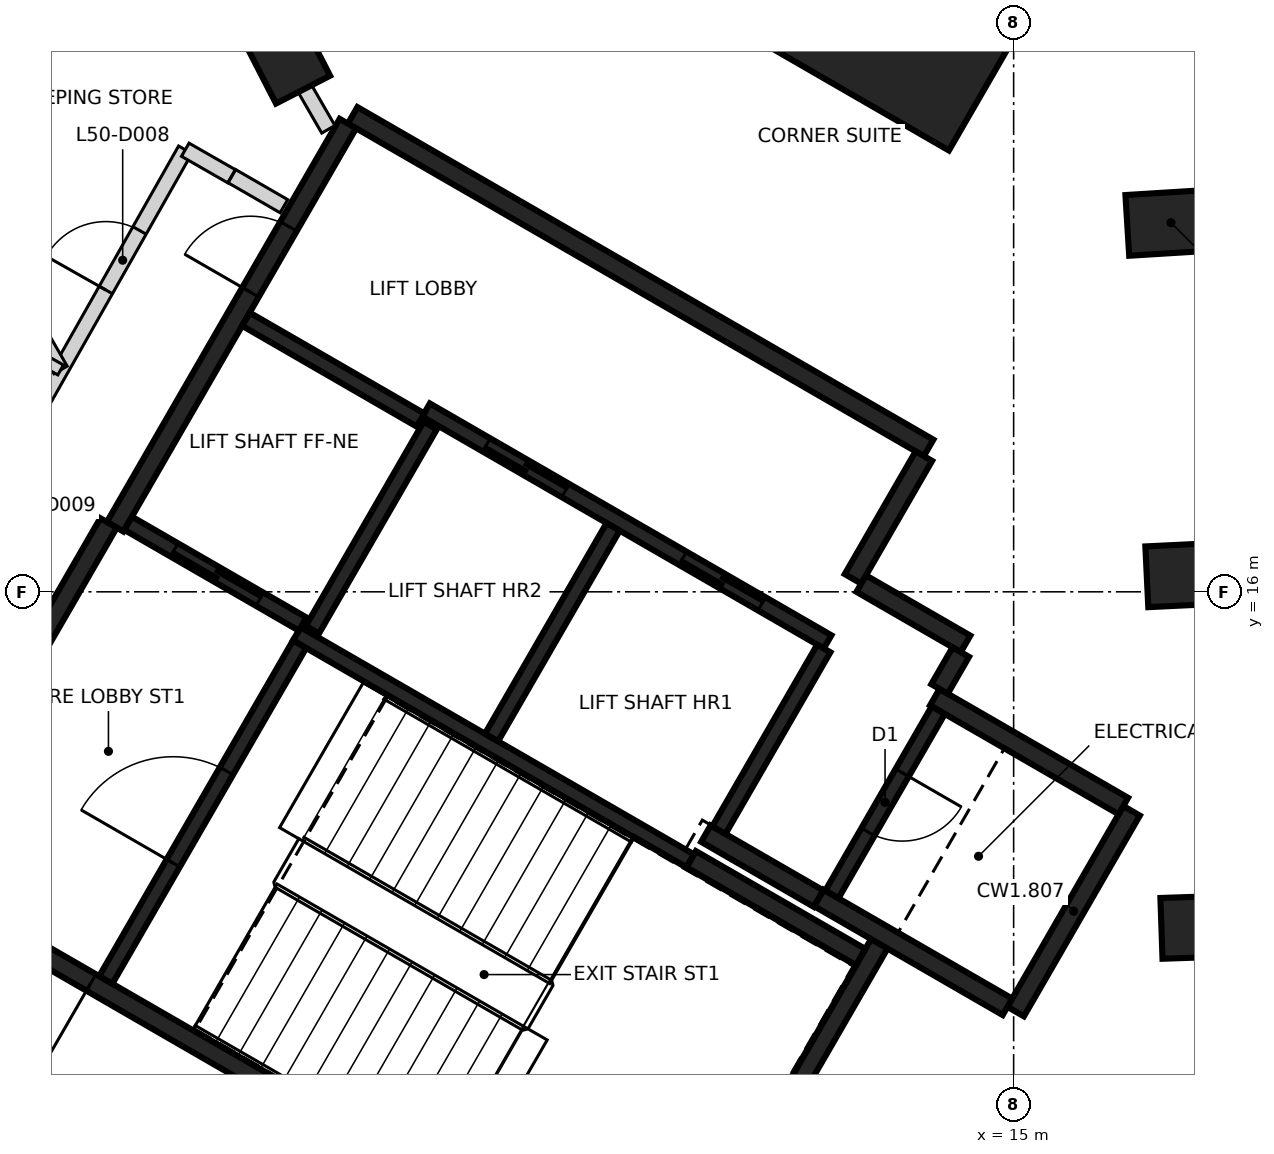
"""IFC4 building model, lengths in metres.
Left out: names, types, materials, properties, quantities, classifications, styles, units other than length and angle.
Written with IfcOpenShell. Run it as: python <this file> out.ifc"""

import sys

from ifc_helpers import new_model, si_unit, direction, frame, frame_2d, origin, origin_2d, place, context, subcontext, project, spatial, rectangle, extrude, element, fill, save


model = new_model("IFC4")
c1 = context("Model", 3, precision=1e-05, world=origin(), true_north=direction((0.0, 1.0)))
c2 = subcontext(c1, "Body", "Model", "MODEL_VIEW")
j1 = project(units=[si_unit("LENGTHUNIT", "METRE"), si_unit("PLANEANGLEUNIT", "RADIAN")], contexts=[c1])
p1 = place(None, origin())
s1 = spatial("IfcSite", under=j1, at=p1, CompositionType="ELEMENT")
p2 = place(p1, origin())
s2 = spatial("IfcBuilding", under=s1, at=p2, CompositionType="ELEMENT")
p3 = place(p2, frame((0.0, 0.0, 200.8)))
s3 = spatial("IfcBuildingStorey", under=s2, at=p3, CompositionType="ELEMENT", Elevation=200.8)
for number, where, z_axis, x_axis in (
    (1, (17.519, 11.592, -0.35), (0.0, 0.0, 1.0), (0.999, 0.034, 0.0)),
    (2, (17.326, 16.226, -0.35), (0.0, 0.0, 1.0), (0.999, 0.048, 0.0)),
    (3, (17.07, 20.856, -0.35), (0.0, 0.0, 1.0), (0.998, 0.062, 0.0)),
    (4, (5.388, 23.118, -0.35), (0.0, 0.0, 1.0), (-0.458, 0.889, 0.0)),
):
    element("IfcColumn", number, at=place(p3, frame(where, z_axis=z_axis, x_axis=x_axis)), inside=s3, PredefinedType="COLUMN", context=c2, shape_type="SweptSolid", body=[
        extrude(rectangle(XDim=1.15, YDim=0.8, at=origin_2d()), origin(), (0.0, 0.0, 1.0), 3.6),
    ])
p4 = place(p3, frame((13.78, 23.867, -0.35), z_axis=(0.0, 0.0, 1.0), x_axis=(0.5, 0.866025403784, 0.0)))
e5 = element("IfcColumn", 5, at=p4, inside=s3, PredefinedType="COLUMN", context=c2, shape_type="SweptSolid", body=[
    extrude(rectangle(XDim=3.2, YDim=2.7, at=origin_2d()), origin(), (0.0, 0.0, 1.0), 3.6),
])
p5 = place(p3, frame((10.42, 6.498, 0.0), z_axis=(0.0, 0.0, 1.0), x_axis=(-0.866021906294, 0.500006057782, 0.0)))
e6 = element("IfcWall", 6, at=p5, inside=s3, PredefinedType="SHEAR", context=c2, shape_type="SweptSolid", body=[
    extrude(rectangle(XDim=11.55, YDim=0.25, at=frame_2d((5.775, 0.0))), origin(), (0.0, 0.0, 1.0), 3.25),
])
p6 = place(p5, frame((10.025, 0.0, 0.0)))
e7 = element("IfcOpeningElement", 7, at=p6, cuts=e6, PredefinedType="OPENING", context=c2, shape_type="SweptSolid", body=[
    extrude(rectangle(XDim=1.2, YDim=2.1, at=frame_2d((0.6, 1.05))), frame((0.0, 0.135, 0.0), z_axis=(0.0, -1.0, 0.0), x_axis=(1.0, 0.0, 0.0)), (0.0, 0.0, 1.0), 0.27),
])
p7 = place(p5, frame((8.725, 0.0, 0.0)))
e8 = element("IfcOpeningElement", 8, at=p7, cuts=e6, PredefinedType="OPENING", context=c2, shape_type="SweptSolid", body=[
    extrude(rectangle(XDim=1.2, YDim=2.1, at=frame_2d((0.6, 1.05))), frame((0.0, 0.135, 0.0), z_axis=(0.0, -1.0, 0.0), x_axis=(1.0, 0.0, 0.0)), (0.0, 0.0, 1.0), 0.27),
])
p8 = place(p3, frame((6.304, 22.269, 0.0), z_axis=(0.0, 0.0, 1.0), x_axis=(0.866022959057, -0.500004234368, 0.0)))
e9 = element("IfcWall", 9, at=p8, inside=s3, PredefinedType="SHEAR", context=c2, shape_type="SweptSolid", body=[
    extrude(rectangle(XDim=8.75, YDim=0.25, at=frame_2d((4.375, 0.0))), origin(), (0.0, 0.0, 1.0), 3.25),
])
p9 = place(p3, frame((3.179, 16.856, 0.0), z_axis=(0.0, 0.0, 1.0), x_axis=(0.500001955336, 0.866024274868, 0.0)))
e10 = element("IfcWall", 10, at=p9, inside=s3, PredefinedType="SHEAR", context=c2, shape_type="SweptSolid", body=[
    extrude(rectangle(XDim=6.125, YDim=0.25, at=frame_2d((3.062, 0.0))), origin(), (0.0, 0.0, 1.0), 3.25),
])
p10 = place(p9, frame((3.563, 0.0, 0.0)))
e11 = element("IfcOpeningElement", 11, at=p10, cuts=e10, PredefinedType="OPENING", context=c2, shape_type="SweptSolid", body=[
    extrude(rectangle(XDim=1.0, YDim=2.1, at=frame_2d((0.5, 1.05))), frame((0.0, 0.135, 0.0), z_axis=(0.0, -1.0, 0.0), x_axis=(1.0, 0.0, 0.0)), (0.0, 0.0, 1.0), 0.27),
])
p11 = place(p3, frame((0.48, 12.381, 0.0), z_axis=(0.0, 0.0, 1.0), x_axis=(0.49999885962, 0.866026062182, 0.0)))
e12 = element("IfcWall", 12, at=p11, inside=s3, PredefinedType="SHEAR", context=c2, shape_type="SweptSolid", body=[
    extrude(rectangle(XDim=5.225, YDim=0.25, at=frame_2d((2.612, 0.0))), origin(), (0.0, 0.0, 1.0), 3.25),
])
p12 = place(p3, frame((13.238, 11.378, 0.0), z_axis=(0.0, 0.0, 1.0), x_axis=(-0.500008851346, -0.866020293397, 0.0)))
e13 = element("IfcWall", 13, at=p12, inside=s3, PredefinedType="SHEAR", context=c2, shape_type="SweptSolid", body=[
    extrude(rectangle(XDim=5.51, YDim=0.25, at=frame_2d((2.755, 0.0))), origin(), (0.0, 0.0, 1.0), 3.25),
])
p13 = place(p3, frame((16.552, 13.119, 0.0), z_axis=(0.0, 0.0, 1.0), x_axis=(-0.499978833458, -0.866037623948, 0.0)))
e14 = element("IfcWall", 14, at=p13, inside=s3, PredefinedType="SHEAR", context=c2, shape_type="SweptSolid", body=[
    extrude(rectangle(XDim=3.05, YDim=0.25, at=frame_2d((1.525, 0.0))), origin(), (0.0, 0.0, 1.0), 3.25),
])
p14 = place(p3, frame((14.918, 10.54, 0.0), z_axis=(0.0, 0.0, 1.0), x_axis=(-0.866063538972, 0.499933942099, 0.0)))
e15 = element("IfcWall", 15, at=p14, inside=s3, PredefinedType="SHEAR", context=c2, shape_type="SweptSolid", body=[
    extrude(rectangle(XDim=2.865, YDim=0.25, at=frame_2d((1.432, 0.0))), origin(), (0.0, 0.0, 1.0), 3.25),
])
p15 = place(p3, frame((13.963, 14.614, 0.0), z_axis=(0.0, 0.0, 1.0), x_axis=(0.866042235819, -0.499970844928, 0.0)))
e16 = element("IfcWall", 16, at=p15, inside=s3, PredefinedType="SHEAR", context=c2, shape_type="SweptSolid", body=[
    extrude(rectangle(XDim=2.865, YDim=0.25, at=frame_2d((1.432, 0.0))), origin(), (0.0, 0.0, 1.0), 3.25),
])
p16 = place(p3, frame((10.757, 12.481, 0.0), z_axis=(0.0, 0.0, 1.0), x_axis=(0.866022940537, -0.500004266446, 0.0)))
e17 = element("IfcWall", 17, at=p16, inside=s3, PredefinedType="SHEAR", context=c2, shape_type="SweptSolid", body=[
    extrude(rectangle(XDim=2.575, YDim=0.25, at=frame_2d((1.287, 0.0))), origin(), (0.0, 0.0, 1.0), 3.25),
])
p17 = place(p3, frame((13.819, 17.785, 0.0), z_axis=(0.0, 0.0, 1.0), x_axis=(-0.500039802285, -0.866002422705, 0.0)))
e18 = element("IfcWall", 18, at=p17, inside=s3, PredefinedType="SHEAR", context=c2, shape_type="SweptSolid", body=[
    extrude(rectangle(XDim=1.865, YDim=0.25, at=frame_2d((0.932, 0.0))), origin(), (0.0, 0.0, 1.0), 3.25),
])
p18 = place(p3, frame((12.433, 11.964, 0.0), z_axis=(0.0, 0.0, 1.0), x_axis=(-0.866038183914, 0.499977863513, 0.0)))
e19 = element("IfcWall", 19, at=p18, inside=s3, PredefinedType="SHEAR", context=c2, shape_type="SweptSolid", body=[
    extrude(rectangle(XDim=1.71, YDim=0.25, at=frame_2d((0.855, 0.0))), origin(), (0.0, 0.0, 1.0), 3.25),
])
p19 = place(p3, frame((12.995, 16.108, 0.0), z_axis=(0.0, 0.0, 1.0), x_axis=(0.866044474677, -0.49996696679, 0.0)))
e20 = element("IfcWall", 20, at=p19, inside=s3, PredefinedType="SHEAR", context=c2, shape_type="SweptSolid", body=[
    extrude(rectangle(XDim=1.584, YDim=0.25, at=frame_2d((0.792, 0.0))), origin(), (0.0, 0.0, 1.0), 3.25),
])
p20 = place(p3, frame((14.305, 15.207, 0.0), z_axis=(0.0, 0.0, 1.0), x_axis=(-0.499848422343, -0.866112899501, 0.0)))
e21 = element("IfcWall", 21, at=p20, inside=s3, PredefinedType="SHEAR", context=c2, shape_type="SweptSolid", body=[
    extrude(rectangle(XDim=0.559, YDim=0.25, at=frame_2d((0.28, 0.0))), origin(), (0.0, 0.0, 1.0), 3.25),
])
p21 = place(p3, frame((12.552, 15.342, 0.0), z_axis=(0.0, 0.0, 1.0), x_axis=(-0.866030299012, 0.499991521122, 0.0)))
e22 = element("IfcWall", 22, at=p21, inside=s3, PredefinedType="SHEAR", context=c2, shape_type="SweptSolid", body=[
    extrude(rectangle(XDim=6.1, YDim=0.2, at=frame_2d((3.05, 0.0))), origin(), (0.0, 0.0, 1.0), 3.25),
])
p22 = place(p21, frame((1.0, 0.0, 0.0)))
e23 = element("IfcOpeningElement", 23, at=p22, cuts=e22, PredefinedType="OPENING", context=c2, shape_type="SweptSolid", body=[
    extrude(rectangle(XDim=1.2, YDim=2.1, at=frame_2d((0.6, 1.05))), frame((0.0, 0.11, 0.0), z_axis=(0.0, -1.0, 0.0), x_axis=(1.0, 0.0, 0.0)), (0.0, 0.0, 1.0), 0.22),
])
p23 = place(p21, frame((3.982, 0.0, 0.0)))
e24 = element("IfcOpeningElement", 24, at=p23, cuts=e22, PredefinedType="OPENING", context=c2, shape_type="SweptSolid", body=[
    extrude(rectangle(XDim=1.2, YDim=2.1, at=frame_2d((0.6, 1.05))), frame((0.0, 0.11, 0.0), z_axis=(0.0, -1.0, 0.0), x_axis=(1.0, 0.0, 0.0)), (0.0, 0.0, 1.0), 0.22),
])
p24 = place(p3, frame((10.743, 12.46, 0.0), z_axis=(0.0, 0.0, 1.0), x_axis=(-0.866018848283, 0.500011354289, 0.0)))
e25 = element("IfcWall", 25, at=p24, inside=s3, PredefinedType="SHEAR", context=c2, shape_type="SweptSolid", body=[
    extrude(rectangle(XDim=5.974, YDim=0.2, at=frame_2d((2.987, 0.0))), origin(), (0.0, 0.0, 1.0), 3.25),
])
p25 = place(p3, frame((3.057, 10.895, 0.0), z_axis=(0.0, 0.0, 1.0), x_axis=(0.500027839223, 0.866009330205, 0.0)))
e26 = element("IfcWall", 26, at=p25, inside=s3, PredefinedType="SHEAR", context=c2, shape_type="SweptSolid", body=[
    extrude(rectangle(XDim=5.098, YDim=0.2, at=frame_2d((2.549, 0.0))), origin(), (0.0, 0.0, 1.0), 3.25),
])
p26 = place(p25, frame((1.774, 0.0, 0.0)))
e27 = element("IfcOpeningElement", 27, at=p26, cuts=e26, PredefinedType="OPENING", context=c2, shape_type="SweptSolid", body=[
    extrude(rectangle(XDim=1.4, YDim=2.1, at=frame_2d((0.7, 1.05))), frame((0.0, 0.11, 0.0), z_axis=(0.0, -1.0, 0.0), x_axis=(1.0, 0.0, 0.0)), (0.0, 0.0, 1.0), 0.22),
])
p27 = place(p3, frame((8.132, 14.084, 0.0), z_axis=(0.0, 0.0, 1.0), x_axis=(0.500030834389, 0.86600760081, 0.0)))
e28 = element("IfcWall", 28, at=p27, inside=s3, PredefinedType="SHEAR", context=c2, shape_type="SweptSolid", body=[
    extrude(rectangle(XDim=3.198, YDim=0.2, at=frame_2d((1.599, 0.0))), origin(), (0.0, 0.0, 1.0), 3.25),
])
p28 = place(p3, frame((14.008, 14.442, 0.0), z_axis=(0.0, 0.0, 1.0), x_axis=(-0.499986818241, -0.866033014143, 0.0)))
e29 = element("IfcWall", 29, at=p28, inside=s3, PredefinedType="SHEAR", context=c2, shape_type="SweptSolid", body=[
    extrude(rectangle(XDim=2.798, YDim=0.2, at=frame_2d((1.399, 0.0))), origin(), (0.0, 0.0, 1.0), 3.25),
])
p29 = place(p28, frame((0.949, 0.0, 0.0)))
e30 = element("IfcOpeningElement", 30, at=p29, cuts=e29, PredefinedType="OPENING", context=c2, shape_type="SweptSolid", body=[
    extrude(rectangle(XDim=0.9, YDim=2.1, at=frame_2d((0.45, 1.05))), frame((0.0, 0.11, 0.0), z_axis=(0.0, -1.0, 0.0), x_axis=(1.0, 0.0, 0.0)), (0.0, 0.0, 1.0), 0.22),
])
p30 = place(p3, frame((12.502, 15.255, 0.0), z_axis=(0.0, 0.0, 1.0), x_axis=(-0.499965018551, -0.866045599391, 0.0)))
e31 = element("IfcWall", 31, at=p30, inside=s3, PredefinedType="SHEAR", context=c2, shape_type="SweptSolid", body=[
    extrude(rectangle(XDim=2.759, YDim=0.2, at=frame_2d((1.379, 0.0))), origin(), (0.0, 0.0, 1.0), 3.25),
])
p31 = place(p3, frame((7.324, 18.187, 0.0), z_axis=(0.0, 0.0, 1.0), x_axis=(-0.499967891604, -0.866043940782, 0.0)))
e32 = element("IfcWall", 32, at=p31, inside=s3, PredefinedType="SHEAR", context=c2, shape_type="SweptSolid", body=[
    extrude(rectangle(XDim=3.1, YDim=0.2, at=frame_2d((1.55, 0.0))), origin(), (0.0, 0.0, 1.0), 3.25),
])
p32 = place(p3, frame((5.646, 15.576, 0.0), z_axis=(0.0, 0.0, 1.0), x_axis=(-0.866018407898, 0.500012117035, 0.0)))
e33 = element("IfcWall", 33, at=p32, inside=s3, PredefinedType="SHEAR", context=c2, shape_type="SweptSolid", body=[
    extrude(rectangle(XDim=2.651, YDim=0.2, at=frame_2d((1.325, 0.0))), origin(), (0.0, 0.0, 1.0), 3.25),
])
p33 = place(p32, frame((0.652, 0.0, 0.0)))
e34 = element("IfcOpeningElement", 34, at=p33, cuts=e33, PredefinedType="OPENING", context=c2, shape_type="SweptSolid", body=[
    extrude(rectangle(XDim=1.3, YDim=2.1, at=frame_2d((0.65, 1.05))), frame((0.0, 0.11, 0.0), z_axis=(0.0, -1.0, 0.0), x_axis=(1.0, 0.0, 0.0)), (0.0, 0.0, 1.0), 0.22),
])
p34 = place(p3, frame((7.196, 18.26, 0.0), z_axis=(0.0, 0.0, 1.0), x_axis=(-0.866018407898, 0.500012117035, 0.0)))
e35 = element("IfcWall", 35, at=p34, inside=s3, PredefinedType="SHEAR", context=c2, shape_type="SweptSolid", body=[
    extrude(rectangle(XDim=2.651, YDim=0.2, at=frame_2d((1.325, 0.0))), origin(), (0.0, 0.0, 1.0), 3.25),
])
p35 = place(p3, frame((-1.086, 12.65, 0.0), z_axis=(0.0, 0.0, 1.0), x_axis=(0.492507119433, 0.870308415051, 0.0)))
e36 = element("IfcWall", 36, at=p35, inside=s3, PredefinedType="PARTITIONING", context=c2, shape_type="SweptSolid", body=[
    extrude(rectangle(XDim=10.531, YDim=0.2, at=frame_2d((5.266, 0.0))), origin(), (0.0, 0.0, 1.0), 3.25),
])
p36 = place(p35, frame((8.411, 0.0, 0.0)))
e37 = element("IfcOpeningElement", 37, at=p36, cuts=e36, PredefinedType="OPENING", context=c2, shape_type="SweptSolid", body=[
    extrude(rectangle(XDim=0.9, YDim=2.1, at=frame_2d((0.45, 1.05))), frame((0.0, 0.11, 0.0), z_axis=(0.0, -1.0, 0.0), x_axis=(1.0, 0.0, 0.0)), (0.0, 0.0, 1.0), 0.22),
])
p37 = place(p35, frame((3.664, 0.0, 0.0)))
e38 = element("IfcOpeningElement", 38, at=p37, cuts=e36, PredefinedType="OPENING", context=c2, shape_type="SweptSolid", body=[
    extrude(rectangle(XDim=0.95, YDim=2.1, at=frame_2d((0.475, 1.05))), frame((0.0, 0.11, 0.0), z_axis=(0.0, -1.0, 0.0), x_axis=(1.0, 0.0, 0.0)), (0.0, 0.0, 1.0), 0.22),
])
p38 = place(p3, frame((4.102, 21.816, 0.0), z_axis=(0.0, 0.0, 1.0), x_axis=(0.867664502326, -0.497150189986, 0.0)))
e39 = element("IfcWall", 39, at=p38, inside=s3, PredefinedType="PARTITIONING", context=c2, shape_type="SweptSolid", body=[
    extrude(rectangle(XDim=0.702, YDim=0.2, at=frame_2d((0.351, 0.0))), origin(), (0.0, 0.0, 1.0), 3.25),
])
p39 = place(p3, frame((4.716, 21.468, 0.0), z_axis=(0.0, 0.0, 1.0), x_axis=(0.865912682783, -0.500195187698, 0.0)))
e40 = element("IfcWall", 40, at=p39, inside=s3, PredefinedType="PARTITIONING", context=c2, shape_type="SweptSolid", body=[
    extrude(rectangle(XDim=0.79, YDim=0.2, at=frame_2d((0.395, 0.0))), origin(), (0.0, 0.0, 1.0), 3.25),
])
p40 = place(p3, frame((0.076, 23.052, 0.0), z_axis=(0.0, 0.0, 1.0), x_axis=(0.499957131376, -0.866050152581, 0.0)))
e41 = element("IfcWall", 41, at=p40, inside=s3, PredefinedType="PARTITIONING", context=c2, shape_type="SweptSolid", body=[
    extrude(rectangle(XDim=4.773, YDim=0.2, at=frame_2d((2.386, 0.0))), origin(), (0.0, 0.0, 1.0), 3.25),
])
p41 = place(p3, frame((4.184, 25.203, 0.0), z_axis=(0.0, 0.0, 1.0), x_axis=(0.4998731114, -0.866098650558, 0.0)))
e42 = element("IfcWall", 42, at=p41, inside=s3, PredefinedType="PARTITIONING", context=c2, shape_type="SweptSolid", body=[
    extrude(rectangle(XDim=3.601, YDim=0.2, at=frame_2d((1.8, 0.0))), origin(), (0.0, 0.0, 1.0), 3.25),
])
p42 = place(p3, frame((0.373, 20.101, 0.0), z_axis=(0.0, 0.0, 1.0), x_axis=(0.870301279559, -0.492519728334, 0.0)))
e43 = element("IfcWall", 43, at=p42, inside=s3, PredefinedType="PARTITIONING", context=c2, shape_type="SweptSolid", body=[
    extrude(rectangle(XDim=2.4, YDim=0.15, at=frame_2d((1.2, 0.0))), origin(), (0.0, 0.0, 1.0), 3.25),
])
p43 = place(p33, origin())
e44 = element("IfcDoor", 44, at=p43, inside=s3, OperationType="SLIDING_TO_RIGHT", PredefinedType="DOOR", context=c2, shape_type="SweptSolid", body=[
    extrude(rectangle(XDim=1.3, YDim=2.1, at=frame_2d((0.65, 1.05))), frame((0.0, 0.025, 0.0), z_axis=(0.0, -1.0, 0.0), x_axis=(1.0, 0.0, 0.0)), (0.0, 0.0, 1.0), 0.05),
])
fill(e34, e44)
p44 = place(p22, origin())
e45 = element("IfcDoor", 45, at=p44, inside=s3, OperationType="DOUBLE_DOOR_SLIDING", PredefinedType="DOOR", context=c2, shape_type="SweptSolid", body=[
    extrude(rectangle(XDim=1.2, YDim=2.1, at=frame_2d((0.6, 1.05))), frame((0.0, 0.025, 0.0), z_axis=(0.0, -1.0, 0.0), x_axis=(1.0, 0.0, 0.0)), (0.0, 0.0, 1.0), 0.05),
])
fill(e23, e45)
p45 = place(p23, origin())
e46 = element("IfcDoor", 46, at=p45, inside=s3, OperationType="DOUBLE_DOOR_SLIDING", PredefinedType="DOOR", context=c2, shape_type="SweptSolid", body=[
    extrude(rectangle(XDim=1.2, YDim=2.1, at=frame_2d((0.6, 1.05))), frame((0.0, 0.025, 0.0), z_axis=(0.0, -1.0, 0.0), x_axis=(1.0, 0.0, 0.0)), (0.0, 0.0, 1.0), 0.05),
])
fill(e24, e46)
p46 = place(p10, origin())
e47 = element("IfcDoor", 47, at=p46, inside=s3, OperationType="SINGLE_SWING_LEFT", PredefinedType="DOOR", context=c2, shape_type="SweptSolid", body=[
    extrude(rectangle(XDim=1.0, YDim=2.1, at=frame_2d((0.5, 1.05))), frame((0.0, 0.025, 0.0), z_axis=(0.0, -1.0, 0.0), x_axis=(1.0, 0.0, 0.0)), (0.0, 0.0, 1.0), 0.05),
])
fill(e11, e47)
p47 = place(p7, origin())
e48 = element("IfcDoor", 48, at=p47, inside=s3, OperationType="SINGLE_SWING_RIGHT", PredefinedType="DOOR", context=c2, shape_type="SweptSolid", body=[
    extrude(rectangle(XDim=1.2, YDim=2.1, at=frame_2d((0.6, 1.05))), frame((0.0, 0.025, 0.0), z_axis=(0.0, -1.0, 0.0), x_axis=(1.0, 0.0, 0.0)), (0.0, 0.0, 1.0), 0.05),
])
fill(e8, e48)
p48 = place(p26, origin())
e49 = element("IfcDoor", 49, at=p48, inside=s3, OperationType="SINGLE_SWING_RIGHT", PredefinedType="DOOR", context=c2, shape_type="SweptSolid", body=[
    extrude(rectangle(XDim=1.4, YDim=2.1, at=frame_2d((0.7, 1.05))), frame((0.0, 0.025, 0.0), z_axis=(0.0, -1.0, 0.0), x_axis=(1.0, 0.0, 0.0)), (0.0, 0.0, 1.0), 0.05),
])
fill(e27, e49)
p49 = place(p29, origin())
e50 = element("IfcDoor", 50, at=p49, inside=s3, OperationType="SINGLE_SWING_LEFT", PredefinedType="DOOR", context=c2, shape_type="SweptSolid", body=[
    extrude(rectangle(XDim=0.9, YDim=2.1, at=frame_2d((0.45, 1.05))), frame((0.0, 0.025, 0.0), z_axis=(0.0, -1.0, 0.0), x_axis=(1.0, 0.0, 0.0)), (0.0, 0.0, 1.0), 0.05),
])
fill(e30, e50)
p50 = place(p36, origin())
e51 = element("IfcDoor", 51, at=p50, inside=s3, OperationType="SINGLE_SWING_LEFT", PredefinedType="DOOR", context=c2, shape_type="SweptSolid", body=[
    extrude(rectangle(XDim=0.9, YDim=2.1, at=frame_2d((0.45, 1.05))), frame((0.0, 0.025, 0.0), z_axis=(0.0, -1.0, 0.0), x_axis=(1.0, 0.0, 0.0)), (0.0, 0.0, 1.0), 0.05),
])
fill(e37, e51)
save(model, sys.argv[1])
